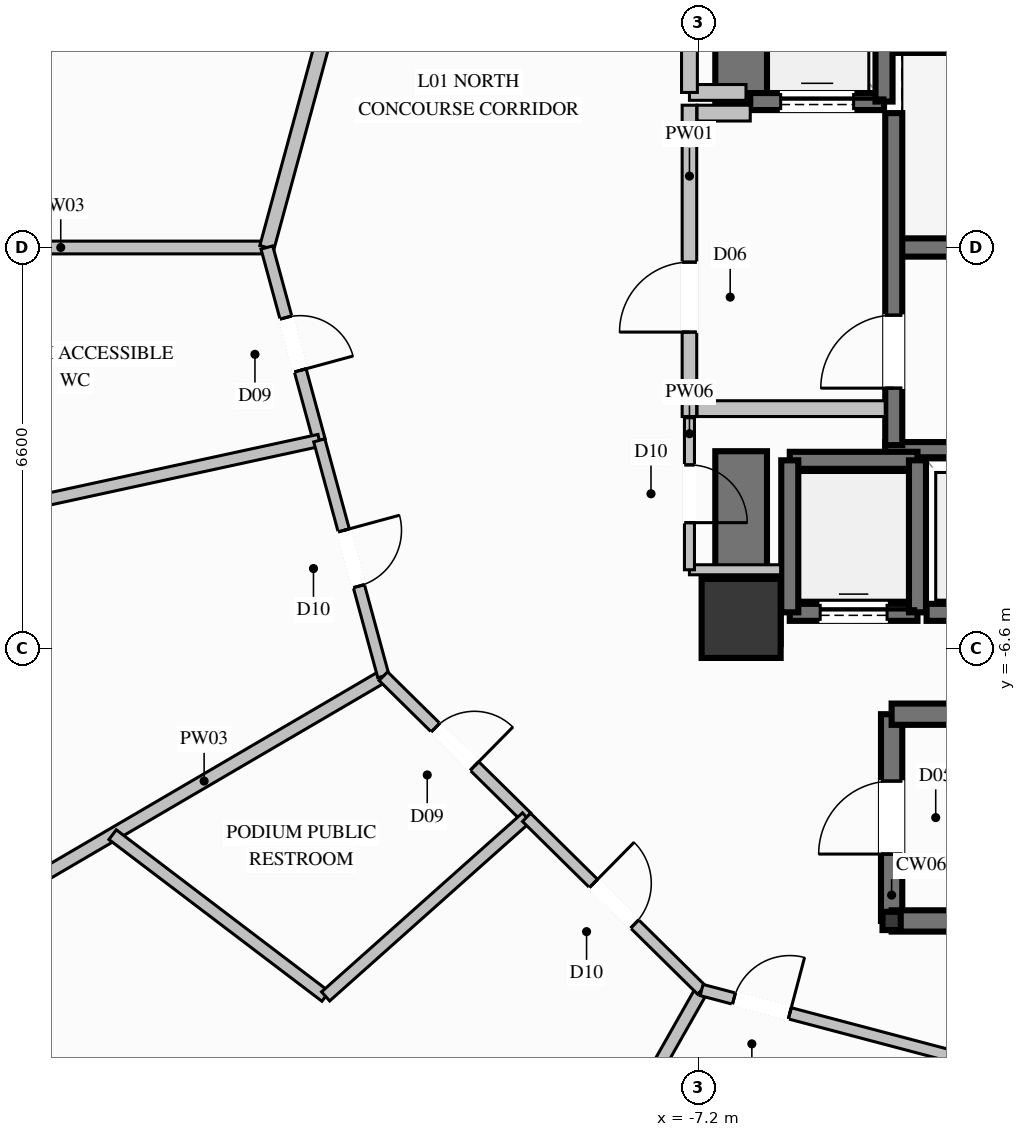
"""IFC4 building model, lengths in metres.
Left out: names, types, materials, properties, quantities, classifications, styles, units other than length and angle.
Written with IfcOpenShell. Run it as: python <this file> out.ifc"""

import sys

from ifc_helpers import new_model, si_unit, direction, frame, frame_2d, origin, origin_2d, place, context, subcontext, project, spatial, rectangle, hollow_rectangle, extrude, element, fill, save


model = new_model("IFC4")
c1 = context("Model", 3, precision=1e-05, world=origin(), true_north=direction((0.0, 1.0)))
c2 = subcontext(c1, "Body", "Model", "MODEL_VIEW")
j1 = project(units=[si_unit("LENGTHUNIT", "METRE"), si_unit("PLANEANGLEUNIT", "RADIAN")], contexts=[c1])
p1 = place(None, origin())
s1 = spatial("IfcSite", under=j1, at=p1, CompositionType="ELEMENT")
p2 = place(p1, origin())
s2 = spatial("IfcBuilding", under=s1, at=p2, CompositionType="ELEMENT")
p3 = place(p2, frame((0.0, 0.0, 7.2)))
s3 = spatial("IfcBuildingStorey", under=s2, at=p3, CompositionType="ELEMENT", Elevation=7.2)
p4 = place(p3, frame((-6.5, -6.1, 0.0), z_axis=(0.0, 0.0, 1.0), x_axis=(1.0, 0.0, 0.0)))
e1 = element("IfcColumn", 1, at=p4, inside=s3, PredefinedType="COLUMN", context=c2, shape_type="SweptSolid", body=[
    extrude(rectangle(XDim=1.3, YDim=1.3, at=origin_2d()), origin(), (0.0, 0.0, 1.0), 5.4),
])
p5 = place(p3, frame((-3.99, 0.0, 0.0), z_axis=(0.0, 0.0, 1.0), x_axis=(1.0, 0.0, 0.0)))
e2 = element("IfcWall", 2, at=p5, inside=s3, PredefinedType="SHEAR", context=c2, shape_type="SweptSolid", body=[
    extrude(rectangle(XDim=7.98, YDim=0.3, at=frame_2d((3.99, 0.0))), origin(), (0.0, 0.0, 1.0), 5.4),
])
for number, where, z_axis, x_axis in (
    (3, (-4.13, -3.325, 0.0), (0.0, 0.0, 1.0), (1.0, 0.0, 0.0)),
    (4, (-4.13, 3.325, 0.0), (0.0, 0.0, 1.0), (1.0, 0.0, 0.0)),
):
    element("IfcWall", number, at=place(p3, frame(where, z_axis=z_axis, x_axis=x_axis)), inside=s3, PredefinedType="SOLIDWALL", context=c2, shape_type="SweptSolid", body=[
        extrude(rectangle(XDim=8.26, YDim=0.25, at=frame_2d((4.13, 0.0))), origin(), (0.0, 0.0, 1.0), 5.4),
    ])
p6 = place(p3, frame((-6.075, -6.1, 0.0), z_axis=(0.0, 0.0, 1.0), x_axis=(1.0, 0.0, 0.0)))
e5 = element("IfcWall", 5, at=p6, inside=s3, PredefinedType="SHEAR", context=c2, shape_type="SweptSolid", body=[
    extrude(rectangle(XDim=0.225, YDim=0.85, at=frame_2d((0.112, 0.0))), origin(), (0.0, 0.0, 1.0), 5.4),
])
p7 = place(p3, frame((-6.5, 2.35, 0.0), z_axis=(0.0, 0.0, 1.0), x_axis=(0.0, 1.0, 0.0)))
e6 = element("IfcWall", 6, at=p7, inside=s3, PredefinedType="SHEAR", context=c2, shape_type="SweptSolid", body=[
    extrude(rectangle(XDim=4.175, YDim=0.85, at=frame_2d((2.087, 0.0))), origin(), (0.0, 0.0, 1.0), 5.4),
])
p8 = place(p3, frame((-6.5, -6.525, 0.0), z_axis=(0.0, 0.0, 1.0), x_axis=(0.0, 1.0, 0.0)))
e7 = element("IfcWall", 7, at=p8, inside=s3, PredefinedType="SHEAR", context=c2, shape_type="SweptSolid", body=[
    extrude(rectangle(XDim=3.175, YDim=0.85, at=frame_2d((1.587, 0.0))), origin(), (0.0, 0.0, 1.0), 5.4),
])
p9 = place(p3, frame((-4.025, -11.075, 0.0), z_axis=(0.0, 0.0, 1.0), x_axis=(1.0, 0.0, 0.0)))
e8 = element("IfcColumn", 8, at=p9, inside=s3, PredefinedType="COLUMN", context=c2, shape_type="SweptSolid", body=[
    extrude(hollow_rectangle(XDim=0.3, YDim=0.3, WallThickness=0.016, at=origin_2d()), origin(), (0.0, 0.0, 1.0), 5.4),
])
p10 = place(p3, frame((-5.7, -6.0, 0.0), z_axis=(0.0, 0.0, 1.0), x_axis=(1.0, 0.0, 0.0)))
e9 = element("IfcWall", 9, at=p10, inside=s3, PredefinedType="SOLIDWALL", context=c2, shape_type="SweptSolid", body=[
    extrude(rectangle(XDim=2.1, YDim=0.28, at=frame_2d((1.05, 0.0))), origin(), (0.0, 0.0, 1.0), 4.98),
])
p11 = place(p10, frame((0.5, 0.0, 0.0)))
e10 = element("IfcOpeningElement", 10, at=p11, cuts=e9, PredefinedType="OPENING", context=c2, shape_type="SweptSolid", body=[
    extrude(rectangle(XDim=1.1, YDim=2.2, at=frame_2d((0.55, 1.1))), frame((0.0, 0.15, 0.0), z_axis=(0.0, -1.0, 0.0), x_axis=(1.0, 0.0, 0.0)), (0.0, 0.0, 1.0), 0.3),
])
p12 = place(p3, frame((-3.6, -3.5, 0.0), z_axis=(0.0, 0.0, 1.0), x_axis=(-1.0, 0.0, 0.0)))
e11 = element("IfcWall", 11, at=p12, inside=s3, PredefinedType="SOLIDWALL", context=c2, shape_type="SweptSolid", body=[
    extrude(rectangle(XDim=2.1, YDim=0.28, at=frame_2d((1.05, 0.0))), origin(), (0.0, 0.0, 1.0), 4.98),
])
for number, where, z_axis, x_axis in (
    (12, (-5.7, -3.5, 0.0), (0.0, 0.0, 1.0), (0.0, -1.0, 0.0)),
    (13, (-3.6, -6.0, 0.0), (0.0, 0.0, 1.0), (0.0, 1.0, 0.0)),
):
    element("IfcWall", number, at=place(p3, frame(where, z_axis=z_axis, x_axis=x_axis)), inside=s3, PredefinedType="SOLIDWALL", context=c2, shape_type="SweptSolid", body=[
        extrude(rectangle(XDim=2.5, YDim=0.28, at=frame_2d((1.25, 0.0))), origin(), (0.0, 0.0, 1.0), 4.98),
    ])
p13 = place(p3, frame((-3.45, -6.0, 0.0), z_axis=(0.0, 0.0, 1.0), x_axis=(1.0, 0.0, 0.0)))
e14 = element("IfcWall", 14, at=p13, inside=s3, PredefinedType="SOLIDWALL", context=c2, shape_type="SweptSolid", body=[
    extrude(rectangle(XDim=2.1, YDim=0.28, at=frame_2d((1.05, 0.0))), origin(), (0.0, 0.0, 1.0), 4.98),
])
p14 = place(p13, frame((0.5, 0.0, 0.0)))
e15 = element("IfcOpeningElement", 15, at=p14, cuts=e14, PredefinedType="OPENING", context=c2, shape_type="SweptSolid", body=[
    extrude(rectangle(XDim=1.1, YDim=2.2, at=frame_2d((0.55, 1.1))), frame((0.0, 0.15, 0.0), z_axis=(0.0, -1.0, 0.0), x_axis=(1.0, 0.0, 0.0)), (0.0, 0.0, 1.0), 0.3),
])
p15 = place(p3, frame((-6.35, 2.4, 0.0), z_axis=(0.0, 0.0, 1.0), x_axis=(1.0, 0.0, 0.0)))
e16 = element("IfcWall", 16, at=p15, inside=s3, PredefinedType="SOLIDWALL", context=c2, shape_type="SweptSolid", body=[
    extrude(rectangle(XDim=2.2, YDim=0.28, at=frame_2d((1.1, 0.0))), origin(), (0.0, 0.0, 1.0), 4.98),
])
p16 = place(p15, frame((0.5, 0.0, 0.0)))
e17 = element("IfcOpeningElement", 17, at=p16, cuts=e16, PredefinedType="OPENING", context=c2, shape_type="SweptSolid", body=[
    extrude(rectangle(XDim=1.2, YDim=2.2, at=frame_2d((0.6, 1.1))), frame((0.0, 0.15, 0.0), z_axis=(0.0, -1.0, 0.0), x_axis=(1.0, 0.0, 0.0)), (0.0, 0.0, 1.0), 0.3),
])
p17 = place(p3, frame((-4.15, 2.4, 0.0), z_axis=(0.0, 0.0, 1.0), x_axis=(0.0, 1.0, 0.0)))
e18 = element("IfcWall", 18, at=p17, inside=s3, PredefinedType="SOLIDWALL", context=c2, shape_type="SweptSolid", body=[
    extrude(rectangle(XDim=2.7, YDim=0.28, at=frame_2d((1.35, 0.0))), origin(), (0.0, 0.0, 1.0), 4.98),
])
p18 = place(p3, frame((-3.99, -3.25, 0.0), z_axis=(0.0, 0.0, 1.0), x_axis=(0.0, 1.0, 0.0)))
e19 = element("IfcWall", 19, at=p18, inside=s3, PredefinedType="SOLIDWALL", context=c2, shape_type="SweptSolid", body=[
    extrude(rectangle(XDim=5.46, YDim=0.28, at=frame_2d((2.73, 0.0))), origin(), (0.0, 0.0, 1.0), 4.98),
])
p19 = place(p18, frame((0.937, 0.0, 0.0)))
e20 = element("IfcOpeningElement", 20, at=p19, cuts=e19, PredefinedType="OPENING", context=c2, shape_type="SweptSolid", body=[
    extrude(rectangle(XDim=1.2, YDim=2.2, at=frame_2d((0.6, 1.1))), frame((0.0, 0.15, 0.0), z_axis=(0.0, -1.0, 0.0), x_axis=(1.0, 0.0, 0.0)), (0.0, 0.0, 1.0), 0.3),
])
p20 = place(p3, frame((-7.35, -2.78, 0.0), z_axis=(0.0, 0.0, 1.0), x_axis=(0.0, 1.0, 0.0)))
e21 = element("IfcWall", 21, at=p20, inside=s3, PredefinedType="PARTITIONING", context=c2, shape_type="SweptSolid", body=[
    extrude(rectangle(XDim=5.12, YDim=0.24, at=frame_2d((2.56, 0.0))), origin(), (0.0, 0.0, 1.0), 3.865),
])
p21 = place(p20, frame((1.389, 0.0, 0.0)))
e22 = element("IfcOpeningElement", 22, at=p21, cuts=e21, PredefinedType="OPENING", context=c2, shape_type="SweptSolid", body=[
    extrude(rectangle(XDim=1.15, YDim=2.2, at=frame_2d((0.575, 1.1))), frame((0.0, 0.13, 0.0), z_axis=(0.0, -1.0, 0.0), x_axis=(1.0, 0.0, 0.0)), (0.0, 0.0, 1.0), 0.26),
])
p22 = place(p3, frame((-7.225, -2.65, 0.0), z_axis=(0.0, 0.0, 1.0), x_axis=(1.0, 0.0, 0.0)))
e23 = element("IfcWall", 23, at=p22, inside=s3, PredefinedType="PARTITIONING", context=c2, shape_type="SweptSolid", body=[
    extrude(rectangle(XDim=3.095, YDim=0.26, at=frame_2d((1.548, 0.0))), origin(), (0.0, 0.0, 1.0), 4.98),
])
p23 = place(p3, frame((-7.225, 2.21, 0.0), z_axis=(0.0, 0.0, 1.0), x_axis=(1.0, 0.0, 0.0)))
e24 = element("IfcWall", 24, at=p23, inside=s3, PredefinedType="PARTITIONING", context=c2, shape_type="SweptSolid", body=[
    extrude(rectangle(XDim=0.875, YDim=0.26, at=frame_2d((0.438, 0.0))), origin(), (0.0, 0.0, 1.0), 4.98),
])
p24 = place(p3, frame((-4.025, -11.075, 0.0), z_axis=(0.0, 0.0, 1.0), x_axis=(0.0, 1.0, 0.0)))
e25 = element("IfcWall", 25, at=p24, inside=s3, PredefinedType="SOLIDWALL", context=c2, shape_type="SweptSolid", body=[
    extrude(rectangle(XDim=3.4, YDim=0.35, at=frame_2d((1.7, 0.0))), origin(), (0.0, 0.0, 1.0), 4.98),
])
p25 = place(p24, frame((1.1, 0.0, 0.0)))
e26 = element("IfcOpeningElement", 26, at=p25, cuts=e25, PredefinedType="OPENING", context=c2, shape_type="SweptSolid", body=[
    extrude(rectangle(XDim=1.2, YDim=2.2, at=frame_2d((0.6, 1.1))), frame((0.0, 0.185, 0.0), z_axis=(0.0, -1.0, 0.0), x_axis=(1.0, 0.0, 0.0)), (0.0, 0.0, 1.0), 0.37),
])
for number, where, z_axis, x_axis in (
    (27, (-4.025, -11.075, 0.0), (0.0, 0.0, 1.0), (1.0, 0.0, 0.0)),
    (28, (4.025, -7.675, 0.0), (0.0, 0.0, 1.0), (-1.0, 0.0, 0.0)),
):
    element("IfcWall", number, at=place(p3, frame(where, z_axis=z_axis, x_axis=x_axis)), inside=s3, PredefinedType="SOLIDWALL", context=c2, shape_type="SweptSolid", body=[
        extrude(rectangle(XDim=8.05, YDim=0.35, at=frame_2d((4.025, 0.0))), origin(), (0.0, 0.0, 1.0), 4.98),
    ])
p26 = place(p3, frame((-7.35, 2.55, 0.0), z_axis=(0.0, 0.0, 1.0), x_axis=(1.0, 0.0, 0.0)))
e29 = element("IfcWall", 29, at=p26, inside=s3, PredefinedType="PARTITIONING", context=c2, shape_type="SweptSolid", body=[
    extrude(rectangle(XDim=0.93, YDim=0.26, at=frame_2d((0.465, 0.0))), origin(), (0.0, 0.0, 1.0), 4.98),
])
p27 = place(p3, frame((-7.35, 2.55, 0.0), z_axis=(0.0, 0.0, 1.0), x_axis=(0.0, 1.0, 0.0)))
e30 = element("IfcWall", 30, at=p27, inside=s3, PredefinedType="PARTITIONING", context=c2, shape_type="SweptSolid", body=[
    extrude(rectangle(XDim=2.4, YDim=0.26, at=frame_2d((1.2, 0.0))), origin(), (0.0, 0.0, 1.0), 3.865),
])
p28 = place(p27, frame((0.775, 0.0, 0.0)))
e31 = element("IfcOpeningElement", 31, at=p28, cuts=e30, PredefinedType="OPENING", context=c2, shape_type="SweptSolid", body=[
    extrude(rectangle(XDim=0.85, YDim=2.05, at=frame_2d((0.425, 1.025))), frame((0.0, 0.14, 0.0), z_axis=(0.0, -1.0, 0.0), x_axis=(1.0, 0.0, 0.0)), (0.0, 0.0, 1.0), 0.28),
])
p29 = place(p3, frame((-7.35, -5.3, 0.0), z_axis=(0.0, 0.0, 1.0), x_axis=(1.0, 0.0, 0.0)))
e32 = element("IfcWall", 32, at=p29, inside=s3, PredefinedType="PARTITIONING", context=c2, shape_type="SweptSolid", body=[
    extrude(rectangle(XDim=1.5, YDim=0.165, at=frame_2d((0.75, 0.0))), origin(), (0.0, 0.0, 1.0), 3.865),
])
p30 = place(p3, frame((-7.35, -2.8, 0.0), z_axis=(0.0, 0.0, 1.0), x_axis=(0.0, -1.0, 0.0)))
e33 = element("IfcWall", 33, at=p30, inside=s3, PredefinedType="PARTITIONING", context=c2, shape_type="SweptSolid", body=[
    extrude(rectangle(XDim=2.5, YDim=0.165, at=frame_2d((1.25, 0.0))), origin(), (0.0, 0.0, 1.0), 3.865),
])
p31 = place(p30, frame((0.775, 0.0, 0.0)))
e34 = element("IfcOpeningElement", 34, at=p31, cuts=e33, PredefinedType="OPENING", context=c2, shape_type="SweptSolid", body=[
    extrude(rectangle(XDim=0.95, YDim=2.1, at=frame_2d((0.475, 1.05))), frame((0.0, 0.093, 0.0), z_axis=(0.0, -1.0, 0.0), x_axis=(1.0, 0.0, 0.0)), (0.0, 0.0, 1.0), 0.185),
])
p32 = place(p3, frame((-14.3, 0.0, 0.0), z_axis=(0.0, 0.0, 1.0), x_axis=(-1.0, 0.0, 0.0)))
e35 = element("IfcWall", 35, at=p32, inside=s3, PredefinedType="PARTITIONING", context=c2, shape_type="SweptSolid", body=[
    extrude(rectangle(XDim=6.78, YDim=0.21, at=frame_2d((3.39, 0.0))), origin(), (0.0, 0.0, 1.0), 4.191),
])
p33 = place(p3, frame((-12.384, -7.05, 0.0), z_axis=(0.0, 0.0, 1.0), x_axis=(-0.863101484719, -0.505030520934, 0.0)))
e36 = element("IfcWall", 36, at=p33, inside=s3, PredefinedType="PARTITIONING", context=c2, shape_type="SweptSolid", body=[
    extrude(rectangle(XDim=6.831, YDim=0.21, at=frame_2d((3.416, 0.0))), origin(), (0.0, 0.0, 1.0), 4.191),
])
p34 = place(p3, frame((-7.15, -12.211, 0.0), z_axis=(0.0, 0.0, 1.0), x_axis=(-0.493203653226, -0.869913878752, 0.0)))
e37 = element("IfcWall", 37, at=p34, inside=s3, PredefinedType="PARTITIONING", context=c2, shape_type="SweptSolid", body=[
    extrude(rectangle(XDim=6.931, YDim=0.21, at=frame_2d((3.465, 0.0))), origin(), (0.0, 0.0, 1.0), 4.191),
])
p35 = place(p3, frame((-12.384, 7.05, 0.0), z_axis=(0.0, 0.0, 1.0), x_axis=(-0.262260528785, -0.964997106235, 0.0)))
e38 = element("IfcWall", 38, at=p35, inside=s3, PredefinedType="PARTITIONING", context=c2, shape_type="SweptSolid", body=[
    extrude(rectangle(XDim=7.306, YDim=0.24, at=frame_2d((3.653, 0.0))), origin(), (0.0, 0.0, 1.0), 4.98),
])
p36 = place(p3, frame((-14.3, 0.0, 0.0), z_axis=(0.0, 0.0, 1.0), x_axis=(0.262250045558, -0.964999955236, 0.0)))
e39 = element("IfcWall", 39, at=p36, inside=s3, PredefinedType="PLUMBINGWALL", context=c2, shape_type="SweptSolid", body=[
    extrude(rectangle(XDim=3.287, YDim=0.2, at=frame_2d((1.644, 0.0))), origin(), (0.0, 0.0, 1.0), 4.98),
])
p37 = place(p36, frame((1.194, 0.0, 0.0)))
e40 = element("IfcOpeningElement", 40, at=p37, cuts=e39, PredefinedType="OPENING", context=c2, shape_type="SweptSolid", body=[
    extrude(rectangle(XDim=0.9, YDim=2.1, at=frame_2d((0.45, 1.05))), frame((0.0, 0.11, 0.0), z_axis=(0.0, -1.0, 0.0), x_axis=(1.0, 0.0, 0.0)), (0.0, 0.0, 1.0), 0.22),
])
p38 = place(p3, frame((-13.438, -3.172, 0.0), z_axis=(0.0, 0.0, 1.0), x_axis=(-0.977241278622, -0.212130816615, 0.0)))
e41 = element("IfcWall", 41, at=p38, inside=s3, PredefinedType="PLUMBINGWALL", context=c2, shape_type="SweptSolid", body=[
    extrude(rectangle(XDim=5.529, YDim=0.2, at=frame_2d((2.764, 0.0))), origin(), (0.0, 0.0, 1.0), 4.98),
])
p39 = place(p3, frame((-13.438, -3.172, 0.0), z_axis=(0.0, 0.0, 1.0), x_axis=(0.262269103922, -0.9649947757, 0.0)))
e42 = element("IfcWall", 42, at=p39, inside=s3, PredefinedType="PARTITIONING", context=c2, shape_type="SweptSolid", body=[
    extrude(rectangle(XDim=4.019, YDim=0.19, at=frame_2d((2.009, 0.0))), origin(), (0.0, 0.0, 1.0), 4.98),
])
p40 = place(p39, frame((1.534, 0.0, 0.0)))
e43 = element("IfcOpeningElement", 43, at=p40, cuts=e42, PredefinedType="OPENING", context=c2, shape_type="SweptSolid", body=[
    extrude(rectangle(XDim=0.95, YDim=2.1, at=frame_2d((0.475, 1.05))), frame((0.0, 0.105, 0.0), z_axis=(0.0, -1.0, 0.0), x_axis=(1.0, 0.0, 0.0)), (0.0, 0.0, 1.0), 0.21),
])
p41 = place(p3, frame((-12.384, -7.05, 0.0), z_axis=(0.0, 0.0, 1.0), x_axis=(0.712072104827, -0.70210634346, 0.0)))
e44 = element("IfcWall", 44, at=p41, inside=s3, PredefinedType="PLUMBINGWALL", context=c2, shape_type="SweptSolid", body=[
    extrude(rectangle(XDim=3.307, YDim=0.2, at=frame_2d((1.654, 0.0))), origin(), (0.0, 0.0, 1.0), 4.98),
])
p42 = place(p41, frame((1.204, 0.0, 0.0)))
e45 = element("IfcOpeningElement", 45, at=p42, cuts=e44, PredefinedType="OPENING", context=c2, shape_type="SweptSolid", body=[
    extrude(rectangle(XDim=0.9, YDim=2.1, at=frame_2d((0.45, 1.05))), frame((0.0, 0.11, 0.0), z_axis=(0.0, -1.0, 0.0), x_axis=(1.0, 0.0, 0.0)), (0.0, 0.0, 1.0), 0.22),
])
p43 = place(p3, frame((-16.837, -9.656, 0.0), z_axis=(0.0, 0.0, 1.0), x_axis=(0.79641562161, -0.60474966528, 0.0)))
e46 = element("IfcWall", 46, at=p43, inside=s3, PredefinedType="PLUMBINGWALL", context=c2, shape_type="SweptSolid", body=[
    extrude(rectangle(XDim=4.398, YDim=0.2, at=frame_2d((2.199, 0.0))), origin(), (0.0, 0.0, 1.0), 4.98),
])
p44 = place(p3, frame((-10.029, -9.372, 0.0), z_axis=(0.0, 0.0, 1.0), x_axis=(-0.746721111404, -0.66513726537, 0.0)))
e47 = element("IfcWall", 47, at=p44, inside=s3, PredefinedType="PLUMBINGWALL", context=c2, shape_type="SweptSolid", body=[
    extrude(rectangle(XDim=4.426, YDim=0.2, at=frame_2d((2.213, 0.0))), origin(), (0.0, 0.0, 1.0), 4.98),
])
p45 = place(p3, frame((-10.029, -9.372, 0.0), z_axis=(0.0, 0.0, 1.0), x_axis=(0.712070649597, -0.702107819343, 0.0)))
e48 = element("IfcWall", 48, at=p45, inside=s3, PredefinedType="PARTITIONING", context=c2, shape_type="SweptSolid", body=[
    extrude(rectangle(XDim=4.043, YDim=0.19, at=frame_2d((2.022, 0.0))), origin(), (0.0, 0.0, 1.0), 4.98),
])
p46 = place(p45, frame((1.547, 0.0, 0.0)))
e49 = element("IfcOpeningElement", 49, at=p46, cuts=e48, PredefinedType="OPENING", context=c2, shape_type="SweptSolid", body=[
    extrude(rectangle(XDim=0.95, YDim=2.1, at=frame_2d((0.475, 1.05))), frame((0.0, 0.105, 0.0), z_axis=(0.0, -1.0, 0.0), x_axis=(1.0, 0.0, 0.0)), (0.0, 0.0, 1.0), 0.21),
])
p47 = place(p3, frame((-7.15, -12.211, 0.0), z_axis=(0.0, 0.0, 1.0), x_axis=(0.966820901533, -0.255455170937, 0.0)))
e50 = element("IfcWall", 50, at=p47, inside=s3, PredefinedType="PARTITIONING", context=c2, shape_type="SweptSolid", body=[
    extrude(rectangle(XDim=7.395, YDim=0.19, at=frame_2d((3.698, 0.0))), origin(), (0.0, 0.0, 1.0), 4.558),
])
p48 = place(p47, frame((0.55, 0.0, 0.0)))
e51 = element("IfcOpeningElement", 51, at=p48, cuts=e50, PredefinedType="OPENING", context=c2, shape_type="SweptSolid", body=[
    extrude(rectangle(XDim=0.95, YDim=2.1, at=frame_2d((0.475, 1.05))), frame((0.0, 0.105, 0.0), z_axis=(0.0, -1.0, 0.0), x_axis=(1.0, 0.0, 0.0)), (0.0, 0.0, 1.0), 0.21),
])
p49 = place(p47, frame((4.845, 0.0, 0.9)))
e52 = element("IfcOpeningElement", 52, at=p49, cuts=e50, PredefinedType="OPENING", context=c2, shape_type="SweptSolid", body=[
    extrude(rectangle(XDim=2.0, YDim=1.6, at=frame_2d((1.0, 0.8))), frame((0.0, 0.105, 0.0), z_axis=(0.0, -1.0, 0.0), x_axis=(1.0, 0.0, 0.0)), (0.0, 0.0, 1.0), 0.21),
])
p50 = place(p11, origin())
e53 = element("IfcDoor", 53, at=p50, inside=s3, OperationType="SLIDING_TO_LEFT", PredefinedType="DOOR", context=c2, shape_type="SweptSolid", body=[
    extrude(rectangle(XDim=1.1, YDim=2.2, at=frame_2d((0.55, 1.1))), frame((0.0, 0.025, 0.0), z_axis=(0.0, -1.0, 0.0), x_axis=(1.0, 0.0, 0.0)), (0.0, 0.0, 1.0), 0.05),
])
fill(e10, e53)
p51 = place(p16, origin())
e54 = element("IfcDoor", 54, at=p51, inside=s3, OperationType="SLIDING_TO_LEFT", PredefinedType="DOOR", context=c2, shape_type="SweptSolid", body=[
    extrude(rectangle(XDim=1.2, YDim=2.2, at=frame_2d((0.6, 1.1))), frame((0.0, 0.025, 0.0), z_axis=(0.0, -1.0, 0.0), x_axis=(1.0, 0.0, 0.0)), (0.0, 0.0, 1.0), 0.05),
])
fill(e17, e54)
p52 = place(p19, origin())
e55 = element("IfcDoor", 55, at=p52, inside=s3, OperationType="SINGLE_SWING_LEFT", PredefinedType="DOOR", context=c2, shape_type="SweptSolid", body=[
    extrude(rectangle(XDim=1.2, YDim=2.2, at=frame_2d((0.6, 1.1))), frame((0.0, 0.025, 0.0), z_axis=(0.0, -1.0, 0.0), x_axis=(1.0, 0.0, 0.0)), (0.0, 0.0, 1.0), 0.05),
])
fill(e20, e55)
p53 = place(p21, origin())
e56 = element("IfcDoor", 56, at=p53, inside=s3, OperationType="SINGLE_SWING_LEFT", PredefinedType="DOOR", context=c2, shape_type="SweptSolid", body=[
    extrude(rectangle(XDim=1.15, YDim=2.2, at=frame_2d((0.575, 1.1))), frame((0.0, 0.025, 0.0), z_axis=(0.0, -1.0, 0.0), x_axis=(1.0, 0.0, 0.0)), (0.0, 0.0, 1.0), 0.05),
])
fill(e22, e56)
p54 = place(p25, origin())
e57 = element("IfcDoor", 57, at=p54, inside=s3, OperationType="SINGLE_SWING_LEFT", PredefinedType="DOOR", context=c2, shape_type="SweptSolid", body=[
    extrude(rectangle(XDim=1.2, YDim=2.2, at=frame_2d((0.6, 1.1))), frame((0.0, 0.025, 0.0), z_axis=(0.0, -1.0, 0.0), x_axis=(1.0, 0.0, 0.0)), (0.0, 0.0, 1.0), 0.05),
])
fill(e26, e57)
p55 = place(p31, origin())
e58 = element("IfcDoor", 58, at=p55, inside=s3, OperationType="SINGLE_SWING_RIGHT", PredefinedType="DOOR", context=c2, shape_type="SweptSolid", body=[
    extrude(rectangle(XDim=0.95, YDim=2.1, at=frame_2d((0.475, 1.05))), frame((0.0, 0.025, 0.0), z_axis=(0.0, -1.0, 0.0), x_axis=(1.0, 0.0, 0.0)), (0.0, 0.0, 1.0), 0.05),
])
fill(e34, e58)
p56 = place(p37, origin())
e59 = element("IfcDoor", 59, at=p56, inside=s3, OperationType="SINGLE_SWING_RIGHT", PredefinedType="DOOR", context=c2, shape_type="SweptSolid", body=[
    extrude(rectangle(XDim=0.9, YDim=2.1, at=frame_2d((0.45, 1.05))), frame((0.0, 0.025, 0.0), z_axis=(0.0, -1.0, 0.0), x_axis=(1.0, 0.0, 0.0)), (0.0, 0.0, 1.0), 0.05),
])
fill(e40, e59)
p57 = place(p40, origin())
e60 = element("IfcDoor", 60, at=p57, inside=s3, OperationType="SINGLE_SWING_LEFT", PredefinedType="DOOR", context=c2, shape_type="SweptSolid", body=[
    extrude(rectangle(XDim=0.95, YDim=2.1, at=frame_2d((0.475, 1.05))), frame((0.0, 0.025, 0.0), z_axis=(0.0, -1.0, 0.0), x_axis=(1.0, 0.0, 0.0)), (0.0, 0.0, 1.0), 0.05),
])
fill(e43, e60)
p58 = place(p42, origin())
e61 = element("IfcDoor", 61, at=p58, inside=s3, OperationType="SINGLE_SWING_RIGHT", PredefinedType="DOOR", context=c2, shape_type="SweptSolid", body=[
    extrude(rectangle(XDim=0.9, YDim=2.1, at=frame_2d((0.45, 1.05))), frame((0.0, 0.025, 0.0), z_axis=(0.0, -1.0, 0.0), x_axis=(1.0, 0.0, 0.0)), (0.0, 0.0, 1.0), 0.05),
])
fill(e45, e61)
p59 = place(p46, origin())
e62 = element("IfcDoor", 62, at=p59, inside=s3, OperationType="SINGLE_SWING_LEFT", PredefinedType="DOOR", context=c2, shape_type="SweptSolid", body=[
    extrude(rectangle(XDim=0.95, YDim=2.1, at=frame_2d((0.475, 1.05))), frame((0.0, 0.025, 0.0), z_axis=(0.0, -1.0, 0.0), x_axis=(1.0, 0.0, 0.0)), (0.0, 0.0, 1.0), 0.05),
])
fill(e49, e62)
p60 = place(p48, origin())
e63 = element("IfcDoor", 63, at=p60, inside=s3, OperationType="SINGLE_SWING_RIGHT", PredefinedType="DOOR", context=c2, shape_type="SweptSolid", body=[
    extrude(rectangle(XDim=0.95, YDim=2.1, at=frame_2d((0.475, 1.05))), frame((0.0, 0.025, 0.0), z_axis=(0.0, -1.0, 0.0), x_axis=(1.0, 0.0, 0.0)), (0.0, 0.0, 1.0), 0.05),
])
fill(e51, e63)
save(model, sys.argv[1])
